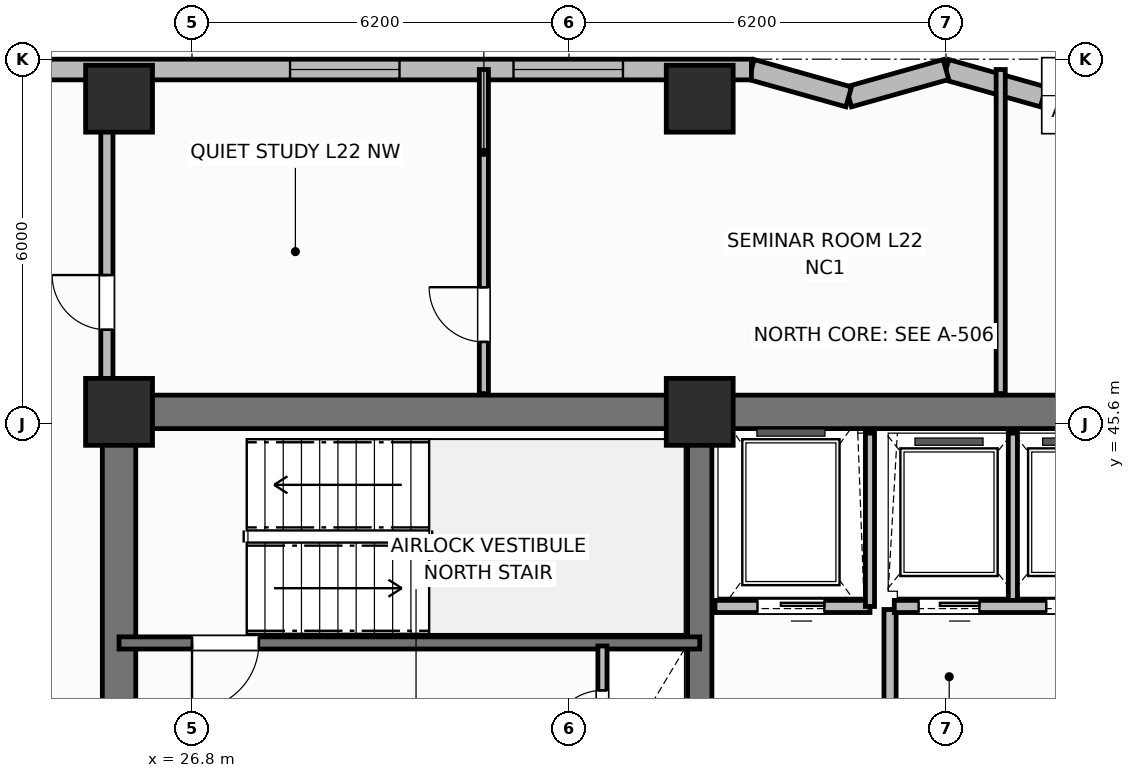
"""IFC4 building model, lengths in metres.
Left out: names, types, materials, properties, quantities, classifications, styles, units other than length and angle.
Written with IfcOpenShell. Run it as: python <this file> out.ifc"""

import sys

from ifc_helpers import new_model, si_unit, direction, frame, frame_2d, origin, origin_2d, place, context, subcontext, project, spatial, rectangle, extrude, element, fill, save


model = new_model("IFC4")
c1 = context("Model", 3, precision=1e-05, world=origin(), true_north=direction((0.0, 1.0)))
c2 = subcontext(c1, "Body", "Model", "MODEL_VIEW")
j1 = project(units=[si_unit("LENGTHUNIT", "METRE"), si_unit("PLANEANGLEUNIT", "RADIAN")], contexts=[c1])
p1 = place(None, origin())
s1 = spatial("IfcSite", under=j1, at=p1, CompositionType="ELEMENT")
p2 = place(p1, origin())
s2 = spatial("IfcBuilding", under=s1, at=p2, CompositionType="ELEMENT")
p3 = place(p2, frame((0.0, 0.0, 92.0)))
s3 = spatial("IfcBuildingStorey", under=s2, at=p3, CompositionType="ELEMENT", Elevation=92.0)
p4 = place(p3, frame((25.6, 45.8, 0.0), z_axis=(0.0, 0.0, 1.0), x_axis=(1.0, 0.0, 0.0)))
e1 = element("IfcWall", 1, at=p4, inside=s3, PredefinedType="SHEAR", context=c2, shape_type="SweptSolid", body=[
    extrude(rectangle(XDim=27.2, YDim=0.55, at=frame_2d((13.6, 0.0))), origin(), (0.0, 0.0, 1.0), 3.7),
])
p5 = place(p3, frame((25.6, 39.875, 0.0), z_axis=(0.0, 0.0, 1.0), x_axis=(0.0, 1.0, 0.0)))
e2 = element("IfcWall", 2, at=p5, inside=s3, PredefinedType="SHEAR", context=c2, shape_type="SweptSolid", body=[
    extrude(rectangle(XDim=5.65, YDim=0.55, at=frame_2d((2.825, 0.0))), origin(), (0.0, 0.0, 1.0), 3.7),
])
p6 = place(p3, frame((35.15, 39.875, 0.0), z_axis=(0.0, 0.0, 1.0), x_axis=(0.0, 1.0, 0.0)))
e3 = element("IfcWall", 3, at=p6, inside=s3, PredefinedType="SHEAR", context=c2, shape_type="SweptSolid", body=[
    extrude(rectangle(XDim=5.65, YDim=0.4, at=frame_2d((2.825, 0.0))), origin(), (0.0, 0.0, 1.0), 3.7),
])
for number, where, z_axis, x_axis in (
    (4, (25.6, 45.8, 0.0), (0.0, 0.0, 1.0), (1.0, 0.0, 0.0)),
    (5, (35.15, 45.8, 0.0), (0.0, 0.0, 1.0), (1.0, 0.0, 0.0)),
    (6, (25.6, 50.95, 0.0), (0.0, 0.0, 1.0), (1.0, 0.0, 0.0)),
    (7, (35.15, 50.95, 0.0), (0.0, 0.0, 1.0), (1.0, 0.0, 0.0)),
):
    element("IfcColumn", number, at=place(p3, frame(where, z_axis=z_axis, x_axis=x_axis)), inside=s3, PredefinedType="COLUMN", context=c2, shape_type="SweptSolid", body=[
        extrude(rectangle(XDim=1.1, YDim=1.1, at=origin_2d()), origin(), (0.0, 0.0, 1.0), 3.7),
    ])
p7 = place(p3, frame((42.4, 51.43, 0.0), z_axis=(0.0, 0.0, 1.0), x_axis=(-0.962652136636, -0.270741322725, 0.0)))
e8 = element("IfcWall", 8, at=p7, inside=s3, PredefinedType="SOLIDWALL", context=c2, shape_type="SweptSolid", body=[
    extrude(rectangle(XDim=1.662, YDim=0.34, at=frame_2d((0.831, 0.0))), origin(), (0.0, 0.0, 1.0), 2.7),
])
p8 = place(p3, frame((40.8, 50.98, 0.0), z_axis=(0.0, 0.0, 1.0), x_axis=(-0.962662902433, 0.270703040766, 0.0)))
e9 = element("IfcWall", 9, at=p8, inside=s3, PredefinedType="SOLIDWALL", context=c2, shape_type="SweptSolid", body=[
    extrude(rectangle(XDim=1.662, YDim=0.34, at=frame_2d((0.831, 0.0))), origin(), (0.0, 0.0, 1.0), 2.7),
])
p9 = place(p3, frame((39.2, 51.43, 0.0), z_axis=(0.0, 0.0, 1.0), x_axis=(-0.962652136636, -0.270741322725, 0.0)))
e10 = element("IfcWall", 10, at=p9, inside=s3, PredefinedType="SOLIDWALL", context=c2, shape_type="SweptSolid", body=[
    extrude(rectangle(XDim=1.662, YDim=0.34, at=frame_2d((0.831, 0.0))), origin(), (0.0, 0.0, 1.0), 2.7),
])
p10 = place(p3, frame((37.6, 50.98, 0.0), z_axis=(0.0, 0.0, 1.0), x_axis=(-0.962662902433, 0.270703040766, 0.0)))
e11 = element("IfcWall", 11, at=p10, inside=s3, PredefinedType="SOLIDWALL", context=c2, shape_type="SweptSolid", body=[
    extrude(rectangle(XDim=1.662, YDim=0.34, at=frame_2d((0.831, 0.0))), origin(), (0.0, 0.0, 1.0), 2.7),
])
p11 = place(p3, frame((36.0, 51.43, 0.0), z_axis=(0.0, 0.0, 1.0), x_axis=(-1.0, 0.0, 0.0)))
e12 = element("IfcWall", 12, at=p11, inside=s3, PredefinedType="SOLIDWALL", context=c2, shape_type="SweptSolid", body=[
    extrude(rectangle(XDim=17.4, YDim=0.34, at=frame_2d((8.7, 0.0))), origin(), (0.0, 0.0, 1.0), 2.7),
])
p12 = place(p11, frame((2.113, 0.0, 0.73)))
e13 = element("IfcOpeningElement", 13, at=p12, cuts=e12, PredefinedType="OPENING", context=c2, shape_type="SweptSolid", body=[
    extrude(rectangle(XDim=1.8, YDim=1.85, at=frame_2d((0.9, 0.925))), frame((0.0, 0.18, 0.0), z_axis=(0.0, -1.0, 0.0), x_axis=(1.0, 0.0, 0.0)), (0.0, 0.0, 1.0), 0.36),
])
p13 = place(p11, frame((5.788, 0.0, 0.73)))
e14 = element("IfcOpeningElement", 14, at=p13, cuts=e12, PredefinedType="OPENING", context=c2, shape_type="SweptSolid", body=[
    extrude(rectangle(XDim=1.8, YDim=1.85, at=frame_2d((0.9, 0.925))), frame((0.0, 0.18, 0.0), z_axis=(0.0, -1.0, 0.0), x_axis=(1.0, 0.0, 0.0)), (0.0, 0.0, 1.0), 0.36),
])
p14 = place(p11, frame((13.837, 0.0, 0.73)))
e15 = element("IfcOpeningElement", 15, at=p14, cuts=e12, PredefinedType="OPENING", context=c2, shape_type="SweptSolid", body=[
    extrude(rectangle(XDim=1.8, YDim=1.85, at=frame_2d((0.9, 0.925))), frame((0.0, 0.18, 0.0), z_axis=(0.0, -1.0, 0.0), x_axis=(1.0, 0.0, 0.0)), (0.0, 0.0, 1.0), 0.36),
])
p15 = place(p3, frame((35.15, 42.0, 0.0), z_axis=(0.0, 0.0, 1.0), x_axis=(-1.0, 0.0, 0.0)))
e16 = element("IfcWall", 16, at=p15, inside=s3, PredefinedType="SHEAR", context=c2, shape_type="SweptSolid", body=[
    extrude(rectangle(XDim=9.55, YDim=0.2, at=frame_2d((4.775, 0.0))), origin(), (0.0, 0.0, 1.0), 3.7),
])
p16 = place(p15, frame((7.25, 0.0, 0.0)))
e17 = element("IfcOpeningElement", 17, at=p16, cuts=e16, PredefinedType="OPENING", context=c2, shape_type="SweptSolid", body=[
    extrude(rectangle(XDim=1.1, YDim=2.15, at=frame_2d((0.55, 1.075))), frame((0.0, 0.11, 0.0), z_axis=(0.0, -1.0, 0.0), x_axis=(1.0, 0.0, 0.0)), (0.0, 0.0, 1.0), 0.22),
])
p17 = place(p3, frame((33.55, 39.82, 0.0), z_axis=(0.0, 0.0, 1.0), x_axis=(0.0, 1.0, 0.0)))
e18 = element("IfcWall", 18, at=p17, inside=s3, PredefinedType="PARTITIONING", context=c2, shape_type="SweptSolid", body=[
    extrude(rectangle(XDim=2.13, YDim=0.15, at=frame_2d((1.065, 0.0))), origin(), (0.0, 0.0, 1.0), 2.53),
])
p18 = place(p17, frame((0.55, 0.0, 0.0)))
e19 = element("IfcOpeningElement", 19, at=p18, cuts=e18, PredefinedType="OPENING", context=c2, shape_type="SweptSolid", body=[
    extrude(rectangle(XDim=0.85, YDim=2.05, at=frame_2d((0.425, 1.025))), frame((0.0, 0.085, 0.0), z_axis=(0.0, -1.0, 0.0), x_axis=(1.0, 0.0, 0.0)), (0.0, 0.0, 1.0), 0.17),
])
p19 = place(p3, frame((37.95, 42.6, 0.0), z_axis=(0.0, 0.0, 1.0), x_axis=(-1.0, 0.0, 0.0)))
e20 = element("IfcWall", 20, at=p19, inside=s3, PredefinedType="PARTITIONING", context=c2, shape_type="SweptSolid", body=[
    extrude(rectangle(XDim=2.55, YDim=0.2, at=frame_2d((1.275, 0.0))), origin(), (0.0, 0.0, 1.0), 2.3),
])
p20 = place(p19, frame((0.75, 0.0, 0.0)))
e21 = element("IfcOpeningElement", 21, at=p20, cuts=e20, PredefinedType="OPENING", context=c2, shape_type="SweptSolid", body=[
    extrude(rectangle(XDim=1.1, YDim=2.15, at=frame_2d((0.55, 1.075))), frame((0.0, 0.11, 0.0), z_axis=(0.0, -1.0, 0.0), x_axis=(1.0, 0.0, 0.0)), (0.0, 0.0, 1.0), 0.22),
])
p21 = place(p3, frame((37.95, 42.6, 0.0), z_axis=(0.0, 0.0, 1.0), x_axis=(0.0, 1.0, 0.0)))
e22 = element("IfcWall", 22, at=p21, inside=s3, PredefinedType="PARTITIONING", context=c2, shape_type="SweptSolid", body=[
    extrude(rectangle(XDim=2.85, YDim=0.15, at=frame_2d((1.425, 0.0))), origin(), (0.0, 0.0, 1.0), 2.53),
])
p22 = place(p3, frame((38.28, 39.82, 0.0), z_axis=(0.0, 0.0, 1.0), x_axis=(0.0, 1.0, 0.0)))
e23 = element("IfcWall", 23, at=p22, inside=s3, PredefinedType="PARTITIONING", context=c2, shape_type="SweptSolid", body=[
    extrude(rectangle(XDim=2.73, YDim=0.2, at=frame_2d((1.365, 0.0))), origin(), (0.0, 0.0, 1.0), 2.53),
])
p23 = place(p3, frame((40.3, 42.65, 0.0), z_axis=(0.0, 0.0, 1.0), x_axis=(0.0, 1.0, 0.0)))
e24 = element("IfcWall", 24, at=p23, inside=s3, PredefinedType="PARTITIONING", context=c2, shape_type="SweptSolid", body=[
    extrude(rectangle(XDim=2.8, YDim=0.15, at=frame_2d((1.4, 0.0))), origin(), (0.0, 0.0, 1.0), 2.53),
])
p24 = place(p3, frame((42.95, 42.6, 0.0), z_axis=(0.0, 0.0, 1.0), x_axis=(-1.0, 0.0, 0.0)))
e25 = element("IfcWall", 25, at=p24, inside=s3, PredefinedType="PARTITIONING", context=c2, shape_type="SweptSolid", body=[
    extrude(rectangle(XDim=4.6, YDim=0.2, at=frame_2d((2.3, 0.0))), origin(), (0.0, 0.0, 1.0), 2.3),
])
p25 = place(p24, frame((3.2, 0.0, 0.0)))
e26 = element("IfcOpeningElement", 26, at=p25, cuts=e25, PredefinedType="OPENING", context=c2, shape_type="SweptSolid", body=[
    extrude(rectangle(XDim=1.0, YDim=2.15, at=frame_2d((0.5, 1.075))), frame((0.0, 0.11, 0.0), z_axis=(0.0, -1.0, 0.0), x_axis=(1.0, 0.0, 0.0)), (0.0, 0.0, 1.0), 0.22),
])
p26 = place(p24, frame((1.1, 0.0, 0.0)))
e27 = element("IfcOpeningElement", 27, at=p26, cuts=e25, PredefinedType="OPENING", context=c2, shape_type="SweptSolid", body=[
    extrude(rectangle(XDim=1.0, YDim=2.15, at=frame_2d((0.5, 1.075))), frame((0.0, 0.11, 0.0), z_axis=(0.0, -1.0, 0.0), x_axis=(1.0, 0.0, 0.0)), (0.0, 0.0, 1.0), 0.22),
])
p27 = place(p3, frame((31.6, 46.1, 0.0), z_axis=(0.0, 0.0, 1.0), x_axis=(0.0, 1.0, 0.0)))
e28 = element("IfcWall", 28, at=p27, inside=s3, PredefinedType="PARTITIONING", context=c2, shape_type="SweptSolid", body=[
    extrude(rectangle(XDim=5.33, YDim=0.15, at=frame_2d((2.665, 0.0))), origin(), (0.0, 0.0, 1.0), 2.53),
])
p28 = place(p27, frame((0.85, 0.0, 0.0)))
e29 = element("IfcOpeningElement", 29, at=p28, cuts=e28, PredefinedType="OPENING", context=c2, shape_type="SweptSolid", body=[
    extrude(rectangle(XDim=0.9, YDim=2.1, at=frame_2d((0.45, 1.05))), frame((0.0, 0.085, 0.0), z_axis=(0.0, -1.0, 0.0), x_axis=(1.0, 0.0, 0.0)), (0.0, 0.0, 1.0), 0.17),
])
p29 = place(p3, frame((40.1, 46.1, 0.0), z_axis=(0.0, 0.0, 1.0), x_axis=(0.0, 1.0, 0.0)))
e30 = element("IfcWall", 30, at=p29, inside=s3, PredefinedType="PARTITIONING", context=c2, shape_type="SweptSolid", body=[
    extrude(rectangle(XDim=5.33, YDim=0.15, at=frame_2d((2.665, 0.0))), origin(), (0.0, 0.0, 1.0), 2.53),
])
p30 = place(p3, frame((25.4, 46.1, 0.0), z_axis=(0.0, 0.0, 1.0), x_axis=(0.0, 1.0, 0.0)))
e31 = element("IfcWall", 31, at=p30, inside=s3, PredefinedType="PARTITIONING", context=c2, shape_type="SweptSolid", body=[
    extrude(rectangle(XDim=4.68, YDim=0.2, at=frame_2d((2.34, 0.0))), origin(), (0.0, 0.0, 1.0), 2.53),
])
p31 = place(p30, frame((1.05, 0.0, 0.0)))
e32 = element("IfcOpeningElement", 32, at=p31, cuts=e31, PredefinedType="OPENING", context=c2, shape_type="SweptSolid", body=[
    extrude(rectangle(XDim=0.9, YDim=2.1, at=frame_2d((0.45, 1.05))), frame((0.0, 0.11, 0.0), z_axis=(0.0, -1.0, 0.0), x_axis=(1.0, 0.0, 0.0)), (0.0, 0.0, 1.0), 0.22),
])
p32 = place(p12, origin())
e33 = element("IfcWindow", 33, at=p32, inside=s3, PartitioningType="SINGLE_PANEL", PredefinedType="WINDOW", context=c2, shape_type="SweptSolid", body=[
    extrude(rectangle(XDim=1.8, YDim=1.85, at=frame_2d((0.9, 0.925))), frame((0.0, 0.03, 0.0), z_axis=(0.0, -1.0, 0.0), x_axis=(1.0, 0.0, 0.0)), (0.0, 0.0, 1.0), 0.06),
])
fill(e13, e33)
p33 = place(p13, origin())
e34 = element("IfcWindow", 34, at=p33, inside=s3, PartitioningType="SINGLE_PANEL", PredefinedType="WINDOW", context=c2, shape_type="SweptSolid", body=[
    extrude(rectangle(XDim=1.8, YDim=1.85, at=frame_2d((0.9, 0.925))), frame((0.0, 0.03, 0.0), z_axis=(0.0, -1.0, 0.0), x_axis=(1.0, 0.0, 0.0)), (0.0, 0.0, 1.0), 0.06),
])
fill(e14, e34)
p34 = place(p16, origin())
e35 = element("IfcDoor", 35, at=p34, inside=s3, OperationType="SINGLE_SWING_RIGHT", PredefinedType="DOOR", context=c2, shape_type="SweptSolid", body=[
    extrude(rectangle(XDim=1.1, YDim=2.15, at=frame_2d((0.55, 1.075))), frame((0.0, 0.025, 0.0), z_axis=(0.0, -1.0, 0.0), x_axis=(1.0, 0.0, 0.0)), (0.0, 0.0, 1.0), 0.05),
])
fill(e17, e35)
p35 = place(p18, origin())
e36 = element("IfcDoor", 36, at=p35, inside=s3, OperationType="SINGLE_SWING_LEFT", PredefinedType="TRAPDOOR", context=c2, shape_type="SweptSolid", body=[
    extrude(rectangle(XDim=0.85, YDim=2.05, at=frame_2d((0.425, 1.025))), frame((0.0, 0.025, 0.0), z_axis=(0.0, -1.0, 0.0), x_axis=(1.0, 0.0, 0.0)), (0.0, 0.0, 1.0), 0.05),
])
fill(e19, e36)
p36 = place(p20, origin())
e37 = element("IfcDoor", 37, at=p36, inside=s3, OperationType="SLIDING_TO_LEFT", PredefinedType="DOOR", context=c2, shape_type="SweptSolid", body=[
    extrude(rectangle(XDim=1.1, YDim=2.15, at=frame_2d((0.55, 1.075))), frame((0.0, 0.025, 0.0), z_axis=(0.0, -1.0, 0.0), x_axis=(1.0, 0.0, 0.0)), (0.0, 0.0, 1.0), 0.05),
])
fill(e21, e37)
p37 = place(p25, origin())
e38 = element("IfcDoor", 38, at=p37, inside=s3, OperationType="SLIDING_TO_LEFT", PredefinedType="DOOR", context=c2, shape_type="SweptSolid", body=[
    extrude(rectangle(XDim=1.0, YDim=2.15, at=frame_2d((0.5, 1.075))), frame((0.0, 0.025, 0.0), z_axis=(0.0, -1.0, 0.0), x_axis=(1.0, 0.0, 0.0)), (0.0, 0.0, 1.0), 0.05),
])
fill(e26, e38)
p38 = place(p26, origin())
e39 = element("IfcDoor", 39, at=p38, inside=s3, OperationType="SLIDING_TO_LEFT", PredefinedType="DOOR", context=c2, shape_type="SweptSolid", body=[
    extrude(rectangle(XDim=1.0, YDim=2.15, at=frame_2d((0.5, 1.075))), frame((0.0, 0.025, 0.0), z_axis=(0.0, -1.0, 0.0), x_axis=(1.0, 0.0, 0.0)), (0.0, 0.0, 1.0), 0.05),
])
fill(e27, e39)
p39 = place(p28, origin())
e40 = element("IfcDoor", 40, at=p39, inside=s3, OperationType="SINGLE_SWING_RIGHT", PredefinedType="DOOR", context=c2, shape_type="SweptSolid", body=[
    extrude(rectangle(XDim=0.9, YDim=2.1, at=frame_2d((0.45, 1.05))), frame((0.0, 0.025, 0.0), z_axis=(0.0, -1.0, 0.0), x_axis=(1.0, 0.0, 0.0)), (0.0, 0.0, 1.0), 0.05),
])
fill(e29, e40)
p40 = place(p31, origin())
e41 = element("IfcDoor", 41, at=p40, inside=s3, OperationType="SINGLE_SWING_RIGHT", PredefinedType="DOOR", context=c2, shape_type="SweptSolid", body=[
    extrude(rectangle(XDim=0.9, YDim=2.1, at=frame_2d((0.45, 1.05))), frame((0.0, 0.025, 0.0), z_axis=(0.0, -1.0, 0.0), x_axis=(1.0, 0.0, 0.0)), (0.0, 0.0, 1.0), 0.05),
])
fill(e32, e41)
save(model, sys.argv[1])
